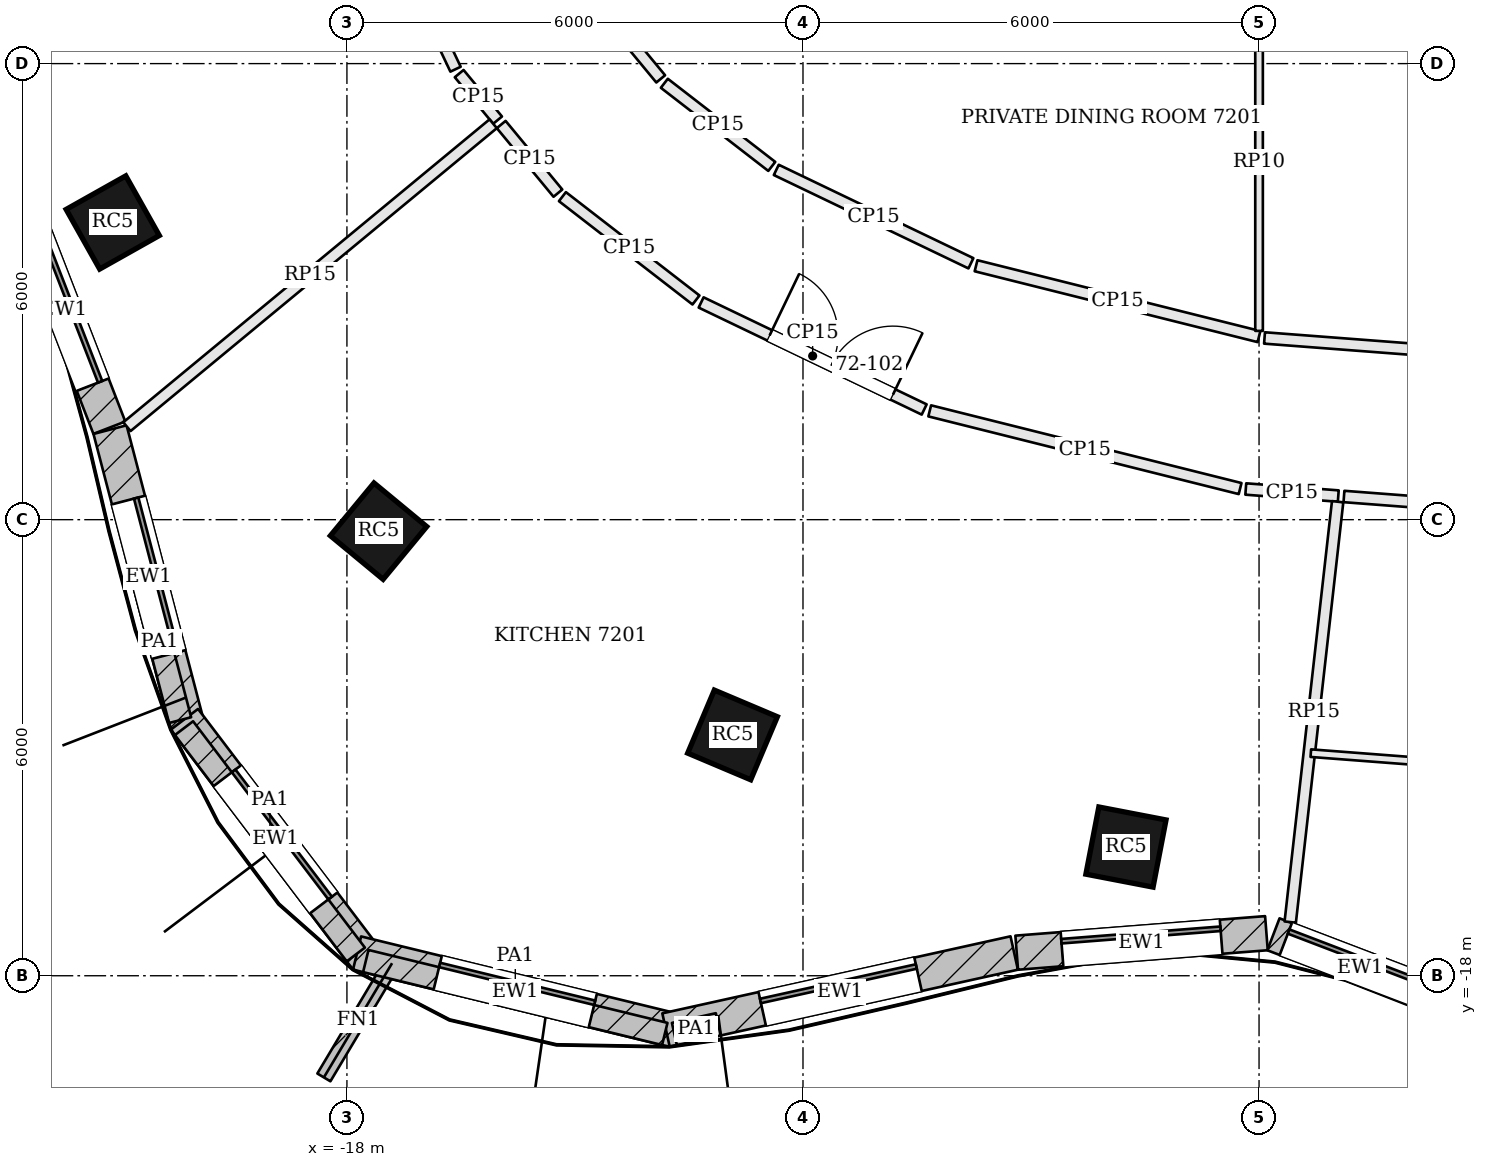
"""IFC4 building model, lengths in metres.
Left out: names, types, materials, properties, quantities, classifications, styles, units other than length and angle.
Written with IfcOpenShell. Run it as: python <this file> out.ifc"""

import sys

from ifc_helpers import new_model, si_unit, direction, frame, frame_2d, origin, origin_2d, place, context, subcontext, project, spatial, rectangle, extrude, element, fill, save


model = new_model("IFC4")
c1 = context("Model", 3, precision=1e-05, world=origin(), true_north=direction((0.0, 1.0)))
c2 = subcontext(c1, "Body", "Model", "MODEL_VIEW")
j1 = project(units=[si_unit("LENGTHUNIT", "METRE"), si_unit("PLANEANGLEUNIT", "RADIAN")], contexts=[c1])
p1 = place(None, origin())
s1 = spatial("IfcSite", under=j1, at=p1, CompositionType="ELEMENT")
p2 = place(p1, origin())
s2 = spatial("IfcBuilding", under=s1, at=p2, CompositionType="ELEMENT")
p3 = place(p2, frame((0.0, 0.0, 292.2)))
s3 = spatial("IfcBuildingStorey", under=s2, at=p3, CompositionType="ELEMENT", Elevation=292.2)
for number, where, z_axis, x_axis in (
    (1, (-21.081, -8.09, 0.0), (0.0, 0.0, 1.0), (0.49, -0.872, 0.0)),
    (2, (-17.584, -12.151, 0.0), (0.0, 0.0, 1.0), (0.771, -0.637, 0.0)),
    (3, (-12.927, -14.832, 0.0), (0.0, 0.0, 1.0), (0.921, -0.389, 0.0)),
    (4, (-7.751, -16.307, 0.0), (0.0, 0.0, 1.0), (0.982, -0.189, 0.0)),
):
    element("IfcColumn", number, at=place(p3, frame(where, z_axis=z_axis, x_axis=x_axis)), inside=s3, PredefinedType="COLUMN", context=c2, shape_type="SweptSolid", body=[
        extrude(rectangle(XDim=0.9, YDim=0.9, at=origin_2d()), origin(), (0.0, 0.0, 1.0), 3.9),
    ])
p4 = place(p3, frame((-22.323, -7.701, 0.0), z_axis=(0.0, 0.0, 1.0), x_axis=(0.361550075906, -0.932352692178, 0.0)))
e5 = element("IfcWall", 5, at=p4, inside=s3, PredefinedType="SOLIDWALL", context=c2, shape_type="SweptSolid", body=[
    extrude(rectangle(XDim=3.313, YDim=0.45, at=frame_2d((1.657, 0.0))), origin(), (0.0, 0.0, 1.0), 3.7),
])
p5 = place(p4, frame((0.607, 0.0, 0.9)))
e6 = element("IfcOpeningElement", 6, at=p5, cuts=e5, PredefinedType="OPENING", context=c2, shape_type="SweptSolid", body=[
    extrude(rectangle(XDim=2.1, YDim=2.3, at=frame_2d((1.05, 1.15))), frame((0.0, 0.235, 0.0), z_axis=(0.0, -1.0, 0.0), x_axis=(1.0, 0.0, 0.0)), (0.0, 0.0, 1.0), 0.47),
])
p6 = place(p3, frame((-21.117, -10.815, 0.0), z_axis=(0.0, 0.0, 1.0), x_axis=(0.253065392985, -0.967449175344, 0.0)))
e7 = element("IfcWall", 7, at=p6, inside=s3, PredefinedType="SOLIDWALL", context=c2, shape_type="SweptSolid", body=[
    extrude(rectangle(XDim=4.015, YDim=0.45, at=frame_2d((2.008, 0.0))), origin(), (0.0, 0.0, 1.0), 3.7),
])
p7 = place(p6, frame((0.958, 0.0, 0.9)))
e8 = element("IfcOpeningElement", 8, at=p7, cuts=e7, PredefinedType="OPENING", context=c2, shape_type="SweptSolid", body=[
    extrude(rectangle(XDim=2.1, YDim=2.3, at=frame_2d((1.05, 1.15))), frame((0.0, 0.235, 0.0), z_axis=(0.0, -1.0, 0.0), x_axis=(1.0, 0.0, 0.0)), (0.0, 0.0, 1.0), 0.47),
])
p8 = place(p3, frame((-20.138, -14.626, 0.0), z_axis=(0.0, 0.0, 1.0), x_axis=(0.604591324894, -0.796535830872, 0.0)))
e9 = element("IfcWall", 9, at=p8, inside=s3, PredefinedType="SOLIDWALL", context=c2, shape_type="SweptSolid", body=[
    extrude(rectangle(XDim=3.965, YDim=0.45, at=frame_2d((1.982, 0.0))), origin(), (0.0, 0.0, 1.0), 3.7),
])
p9 = place(p8, frame((0.932, 0.0, 0.9)))
e10 = element("IfcOpeningElement", 10, at=p9, cuts=e9, PredefinedType="OPENING", context=c2, shape_type="SweptSolid", body=[
    extrude(rectangle(XDim=2.1, YDim=2.3, at=frame_2d((1.05, 1.15))), frame((0.0, 0.235, 0.0), z_axis=(0.0, -1.0, 0.0), x_axis=(1.0, 0.0, 0.0)), (0.0, 0.0, 1.0), 0.47),
])
p10 = place(p3, frame((-17.867, -17.701, 0.0), z_axis=(0.0, 0.0, 1.0), x_axis=(0.971546885012, -0.236847314156, 0.0)))
e11 = element("IfcWall", 11, at=p10, inside=s3, PredefinedType="SOLIDWALL", context=c2, shape_type="SweptSolid", body=[
    extrude(rectangle(XDim=4.285, YDim=0.45, at=frame_2d((2.143, 0.0))), origin(), (0.0, 0.0, 1.0), 3.7),
])
p11 = place(p10, frame((1.093, 0.0, 0.9)))
e12 = element("IfcOpeningElement", 12, at=p11, cuts=e11, PredefinedType="OPENING", context=c2, shape_type="SweptSolid", body=[
    extrude(rectangle(XDim=2.1, YDim=2.3, at=frame_2d((1.05, 1.15))), frame((0.0, 0.235, 0.0), z_axis=(0.0, -1.0, 0.0), x_axis=(1.0, 0.0, 0.0)), (0.0, 0.0, 1.0), 0.47),
])
p12 = place(p3, frame((-13.802, -18.715, 0.0), z_axis=(0.0, 0.0, 1.0), x_axis=(0.976380129166, 0.216059814331, 0.0)))
e13 = element("IfcWall", 13, at=p12, inside=s3, PredefinedType="SOLIDWALL", context=c2, shape_type="SweptSolid", body=[
    extrude(rectangle(XDim=4.692, YDim=0.45, at=frame_2d((2.346, 0.0))), origin(), (0.0, 0.0, 1.0), 3.7),
])
p13 = place(p12, frame((1.296, 0.0, 0.9)))
e14 = element("IfcOpeningElement", 14, at=p13, cuts=e13, PredefinedType="OPENING", context=c2, shape_type="SweptSolid", body=[
    extrude(rectangle(XDim=2.1, YDim=2.3, at=frame_2d((1.05, 1.15))), frame((0.0, 0.235, 0.0), z_axis=(0.0, -1.0, 0.0), x_axis=(1.0, 0.0, 0.0)), (0.0, 0.0, 1.0), 0.47),
])
p14 = place(p3, frame((-9.188, -17.697, 0.0), z_axis=(0.0, 0.0, 1.0), x_axis=(0.996964028691, 0.077863505548, 0.0)))
e15 = element("IfcWall", 15, at=p14, inside=s3, PredefinedType="SOLIDWALL", context=c2, shape_type="SweptSolid", body=[
    extrude(rectangle(XDim=3.295, YDim=0.45, at=frame_2d((1.648, 0.0))), origin(), (0.0, 0.0, 1.0), 3.7),
])
p15 = place(p14, frame((0.598, 0.0, 0.9)))
e16 = element("IfcOpeningElement", 16, at=p15, cuts=e15, PredefinedType="OPENING", context=c2, shape_type="SweptSolid", body=[
    extrude(rectangle(XDim=2.1, YDim=2.3, at=frame_2d((1.05, 1.15))), frame((0.0, 0.235, 0.0), z_axis=(0.0, -1.0, 0.0), x_axis=(1.0, 0.0, 0.0)), (0.0, 0.0, 1.0), 0.47),
])
p16 = place(p3, frame((-5.811, -17.455, 0.0), z_axis=(0.0, 0.0, 1.0), x_axis=(0.934122271306, -0.35695319336, 0.0)))
e17 = element("IfcWall", 17, at=p16, inside=s3, PredefinedType="SOLIDWALL", context=c2, shape_type="SweptSolid", body=[
    extrude(rectangle(XDim=2.448, YDim=0.45, at=frame_2d((1.224, 0.0))), origin(), (0.0, 0.0, 1.0), 3.7),
])
p17 = place(p16, frame((0.174, 0.0, 0.9)))
e18 = element("IfcOpeningElement", 18, at=p17, cuts=e17, PredefinedType="OPENING", context=c2, shape_type="SweptSolid", body=[
    extrude(rectangle(XDim=2.1, YDim=2.3, at=frame_2d((1.05, 1.15))), frame((0.0, 0.235, 0.0), z_axis=(0.0, -1.0, 0.0), x_axis=(1.0, 0.0, 0.0)), (0.0, 0.0, 1.0), 0.47),
])
p18 = place(p3, frame((-17.406, -17.835, 0.0), z_axis=(0.0, 0.0, 1.0), x_axis=(-0.512648290506, -0.858598701514, 0.0)))
e19 = element("IfcWall", 19, at=p18, inside=s3, PredefinedType="SOLIDWALL", context=c2, shape_type="SweptSolid", body=[
    extrude(rectangle(XDim=1.75, YDim=0.2, at=frame_2d((0.875, 0.0))), origin(), (0.0, 0.0, 1.0), 3.7),
])
p19 = place(p3, frame((-20.733, -12.579, 3.9), z_axis=(0.0, 0.0, 1.0), x_axis=(0.253024439664, -0.967459886989, 0.0)))
e20 = element("IfcWall", 20, at=p19, inside=s3, PredefinedType="PARAPET", context=c2, shape_type="SweptSolid", body=[
    extrude(rectangle(XDim=2.128, YDim=0.3, at=frame_2d((1.064, 0.0))), origin(), (0.0, 0.0, 1.0), 1.1),
])
p20 = place(p3, frame((-20.143, -14.743, 3.9), z_axis=(0.0, 0.0, 1.0), x_axis=(0.60459800049, -0.796530763878, 0.0)))
e21 = element("IfcWall", 21, at=p20, inside=s3, PredefinedType="PARAPET", context=c2, shape_type="SweptSolid", body=[
    extrude(rectangle(XDim=3.739, YDim=0.3, at=frame_2d((1.869, 0.0))), origin(), (0.0, 0.0, 1.0), 1.1),
])
p21 = place(p3, frame((-17.752, -17.807, 3.9), z_axis=(0.0, 0.0, 1.0), x_axis=(0.971541327586, -0.236870109537, 0.0)))
e22 = element("IfcWall", 22, at=p21, inside=s3, PredefinedType="PARAPET", context=c2, shape_type="SweptSolid", body=[
    extrude(rectangle(XDim=4.049, YDim=0.3, at=frame_2d((2.024, 0.0))), origin(), (0.0, 0.0, 1.0), 1.1),
])
p22 = place(p3, frame((-13.692, -18.767, 3.9), z_axis=(0.0, 0.0, 1.0), x_axis=(0.976322856637, 0.216318468024, 0.0)))
e23 = element("IfcWall", 23, at=p22, inside=s3, PredefinedType="PARAPET", context=c2, shape_type="SweptSolid", body=[
    extrude(rectangle(XDim=0.591, YDim=0.3, at=frame_2d((0.296, 0.0))), origin(), (0.0, 0.0, 1.0), 1.1),
])
p23 = place(p3, frame((-17.425, -4.269, 0.0), z_axis=(0.0, 0.0, 1.0), x_axis=(0.427886578366, -0.90383243804, 0.0)))
e24 = element("IfcWall", 24, at=p23, inside=s3, PredefinedType="PARTITIONING", context=c2, shape_type="SweptSolid", body=[
    extrude(rectangle(XDim=1.996, YDim=0.15, at=frame_2d((0.998, 0.0))), origin(), (0.0, 0.0, 1.0), 3.198),
])
p24 = place(p3, frame((-16.523, -6.132, 0.0), z_axis=(0.0, 0.0, 1.0), x_axis=(0.636698606768, -0.771112757085, 0.0)))
e25 = element("IfcWall", 25, at=p24, inside=s3, PredefinedType="PARTITIONING", context=c2, shape_type="SweptSolid", body=[
    extrude(rectangle(XDim=0.794, YDim=0.15, at=frame_2d((0.397, 0.0))), origin(), (0.0, 0.0, 1.0), 3.198),
])
p25 = place(p3, frame((-20.894, -10.777, 0.0), z_axis=(0.0, 0.0, 1.0), x_axis=(0.770606553, 0.637311180251, 0.0)))
e26 = element("IfcWall", 26, at=p25, inside=s3, PredefinedType="PARTITIONING", context=c2, shape_type="SweptSolid", body=[
    extrude(rectangle(XDim=6.253, YDim=0.15, at=frame_2d((3.126, 0.0))), origin(), (0.0, 0.0, 1.0), 3.234),
])
p26 = place(p3, frame((-15.97, -6.802, 0.0), z_axis=(0.0, 0.0, 1.0), x_axis=(0.636897609689, -0.770948399552, 0.0)))
e27 = element("IfcWall", 27, at=p26, inside=s3, PredefinedType="PARTITIONING", context=c2, shape_type="SweptSolid", body=[
    extrude(rectangle(XDim=1.171, YDim=0.15, at=frame_2d((0.585, 0.0))), origin(), (0.0, 0.0, 1.0), 3.198),
])
p27 = place(p3, frame((-15.165, -7.75, 0.0), z_axis=(0.0, 0.0, 1.0), x_axis=(0.790917548929, -0.611922732701, 0.0)))
e28 = element("IfcWall", 28, at=p27, inside=s3, PredefinedType="PARTITIONING", context=c2, shape_type="SweptSolid", body=[
    extrude(rectangle(XDim=2.222, YDim=0.15, at=frame_2d((1.111, 0.0))), origin(), (0.0, 0.0, 1.0), 3.198),
])
p28 = place(p3, frame((-13.34, -9.142, 0.0), z_axis=(0.0, 0.0, 1.0), x_axis=(0.901599124721, -0.432572558425, 0.0)))
e29 = element("IfcWall", 29, at=p28, inside=s3, PredefinedType="PARTITIONING", context=c2, shape_type="SweptSolid", body=[
    extrude(rectangle(XDim=3.255, YDim=0.15, at=frame_2d((1.627, 0.0))), origin(), (0.0, 0.0, 1.0), 3.198),
])
p29 = place(p28, frame((1.0, 0.0, 0.0)))
e30 = element("IfcOpeningElement", 30, at=p29, cuts=e29, PredefinedType="OPENING", context=c2, shape_type="SweptSolid", body=[
    extrude(rectangle(XDim=1.8, YDim=2.1, at=frame_2d((0.9, 1.05))), frame((0.0, 0.085, 0.0), z_axis=(0.0, -1.0, 0.0), x_axis=(1.0, 0.0, 0.0)), (0.0, 0.0, 1.0), 0.17),
])
p30 = place(p3, frame((-10.333, -10.569, 0.0), z_axis=(0.0, 0.0, 1.0), x_axis=(0.970067398009, -0.242835836151, 0.0)))
e31 = element("IfcWall", 31, at=p30, inside=s3, PredefinedType="PARTITIONING", context=c2, shape_type="SweptSolid", body=[
    extrude(rectangle(XDim=4.209, YDim=0.15, at=frame_2d((2.105, 0.0))), origin(), (0.0, 0.0, 1.0), 3.198),
])
p31 = place(p3, frame((-6.175, -11.596, 0.0), z_axis=(0.0, 0.0, 1.0), x_axis=(0.997106038867, -0.076023333621, 0.0)))
e32 = element("IfcWall", 32, at=p31, inside=s3, PredefinedType="PARTITIONING", context=c2, shape_type="SweptSolid", body=[
    extrude(rectangle(XDim=1.22, YDim=0.15, at=frame_2d((0.61, 0.0))), origin(), (0.0, 0.0, 1.0), 3.198),
])
p32 = place(p3, frame((-5.59, -17.294, 0.0), z_axis=(0.0, 0.0, 1.0), x_axis=(0.112044411854, 0.993703200041, 0.0)))
e33 = element("IfcWall", 33, at=p32, inside=s3, PredefinedType="PARTITIONING", context=c2, shape_type="SweptSolid", body=[
    extrude(rectangle(XDim=5.565, YDim=0.15, at=frame_2d((2.783, 0.0))), origin(), (0.0, 0.0, 1.0), 3.234),
])
p33 = place(p3, frame((-4.883, -11.695, 0.0), z_axis=(0.0, 0.0, 1.0), x_axis=(0.997096936577, -0.076142623207, 0.0)))
e34 = element("IfcWall", 34, at=p33, inside=s3, PredefinedType="PARTITIONING", context=c2, shape_type="SweptSolid", body=[
    extrude(rectangle(XDim=3.944, YDim=0.15, at=frame_2d((1.972, 0.0))), origin(), (0.0, 0.0, 1.0), 3.198),
])
p34 = place(p33, frame((1.604, 0.0, 0.0)))
e35 = element("IfcOpeningElement", 35, at=p34, cuts=e34, PredefinedType="OPENING", context=c2, shape_type="SweptSolid", body=[
    extrude(rectangle(XDim=1.8, YDim=2.1, at=frame_2d((0.9, 1.05))), frame((0.0, 0.085, 0.0), z_axis=(0.0, -1.0, 0.0), x_axis=(1.0, 0.0, 0.0)), (0.0, 0.0, 1.0), 0.17),
])
p35 = place(p3, frame((-0.982, -9.987, 0.0), z_axis=(0.0, 0.0, 1.0), x_axis=(-0.997096607341, 0.07614693447, 0.0)))
e36 = element("IfcWall", 36, at=p35, inside=s3, PredefinedType="PARTITIONING", context=c2, shape_type="SweptSolid", body=[
    extrude(rectangle(XDim=4.96, YDim=0.15, at=frame_2d((2.48, 0.0))), origin(), (0.0, 0.0, 1.0), 3.198),
])
p36 = place(p3, frame((-6.001, -9.591, 0.0), z_axis=(0.0, 0.0, 1.0), x_axis=(-0.970063855769, 0.242849986061, 0.0)))
e37 = element("IfcWall", 37, at=p36, inside=s3, PredefinedType="PARTITIONING", context=c2, shape_type="SweptSolid", body=[
    extrude(rectangle(XDim=3.837, YDim=0.15, at=frame_2d((1.919, 0.0))), origin(), (0.0, 0.0, 1.0), 3.198),
])
p37 = place(p3, frame((-9.791, -8.627, 0.0), z_axis=(0.0, 0.0, 1.0), x_axis=(-0.901598165215, 0.432574558292, 0.0)))
e38 = element("IfcWall", 38, at=p37, inside=s3, PredefinedType="PARTITIONING", context=c2, shape_type="SweptSolid", body=[
    extrude(rectangle(XDim=2.84, YDim=0.15, at=frame_2d((1.42, 0.0))), origin(), (0.0, 0.0, 1.0), 3.198),
])
p38 = place(p3, frame((-12.411, -7.353, 0.0), z_axis=(0.0, 0.0, 1.0), x_axis=(-0.790894311556, 0.611952766109, 0.0)))
e39 = element("IfcWall", 39, at=p38, inside=s3, PredefinedType="PARTITIONING", context=c2, shape_type="SweptSolid", body=[
    extrude(rectangle(XDim=1.787, YDim=0.15, at=frame_2d((0.894, 0.0))), origin(), (0.0, 0.0, 1.0), 3.198),
])
p39 = place(p3, frame((-13.872, -6.201, 0.0), z_axis=(0.0, 0.0, 1.0), x_axis=(-0.636832838855, 0.771001903601, 0.0)))
e40 = element("IfcWall", 40, at=p39, inside=s3, PredefinedType="PARTITIONING", context=c2, shape_type="SweptSolid", body=[
    extrude(rectangle(XDim=1.558, YDim=0.15, at=frame_2d((0.779, 0.0))), origin(), (0.0, 0.0, 1.0), 3.198),
])
p40 = place(p3, frame((-1.073, -15.396, 0.0), z_axis=(0.0, 0.0, 1.0), x_axis=(-0.997093140471, 0.076192317369, 0.0)))
e41 = element("IfcWall", 41, at=p40, inside=s3, PredefinedType="PARTITIONING", context=c2, shape_type="SweptSolid", body=[
    extrude(rectangle(XDim=4.259, YDim=0.1, at=frame_2d((2.129, 0.0))), origin(), (0.0, 0.0, 1.0), 3.198),
])
p41 = place(p3, frame((-6.0, -9.516, 0.0), z_axis=(0.0, 0.0, 1.0), x_axis=(0.0, 1.0, 0.0)))
e42 = element("IfcWall", 42, at=p41, inside=s3, PredefinedType="PARTITIONING", context=c2, shape_type="SweptSolid", body=[
    extrude(rectangle(XDim=4.441, YDim=0.1, at=frame_2d((2.221, 0.0))), origin(), (0.0, 0.0, 1.0), 3.198),
])
p42 = place(p5, origin())
e43 = element("IfcWindow", 43, at=p42, inside=s3, PartitioningType="SINGLE_PANEL", PredefinedType="WINDOW", context=c2, shape_type="SweptSolid", body=[
    extrude(rectangle(XDim=2.1, YDim=2.3, at=frame_2d((1.05, 1.15))), frame((0.0, 0.135, 0.0), z_axis=(0.0, -1.0, 0.0), x_axis=(1.0, 0.0, 0.0)), (0.0, 0.0, 1.0), 0.06),
])
fill(e6, e43)
p43 = place(p7, origin())
e44 = element("IfcWindow", 44, at=p43, inside=s3, PartitioningType="SINGLE_PANEL", PredefinedType="WINDOW", context=c2, shape_type="SweptSolid", body=[
    extrude(rectangle(XDim=2.1, YDim=2.3, at=frame_2d((1.05, 1.15))), frame((0.0, 0.135, 0.0), z_axis=(0.0, -1.0, 0.0), x_axis=(1.0, 0.0, 0.0)), (0.0, 0.0, 1.0), 0.06),
])
fill(e8, e44)
p44 = place(p9, origin())
e45 = element("IfcWindow", 45, at=p44, inside=s3, PartitioningType="SINGLE_PANEL", PredefinedType="WINDOW", context=c2, shape_type="SweptSolid", body=[
    extrude(rectangle(XDim=2.1, YDim=2.3, at=frame_2d((1.05, 1.15))), frame((0.0, 0.135, 0.0), z_axis=(0.0, -1.0, 0.0), x_axis=(1.0, 0.0, 0.0)), (0.0, 0.0, 1.0), 0.06),
])
fill(e10, e45)
p45 = place(p11, origin())
e46 = element("IfcWindow", 46, at=p45, inside=s3, PartitioningType="SINGLE_PANEL", PredefinedType="WINDOW", context=c2, shape_type="SweptSolid", body=[
    extrude(rectangle(XDim=2.1, YDim=2.3, at=frame_2d((1.05, 1.15))), frame((0.0, 0.135, 0.0), z_axis=(0.0, -1.0, 0.0), x_axis=(1.0, 0.0, 0.0)), (0.0, 0.0, 1.0), 0.06),
])
fill(e12, e46)
p46 = place(p13, origin())
e47 = element("IfcWindow", 47, at=p46, inside=s3, PartitioningType="SINGLE_PANEL", PredefinedType="WINDOW", context=c2, shape_type="SweptSolid", body=[
    extrude(rectangle(XDim=2.1, YDim=2.3, at=frame_2d((1.05, 1.15))), frame((0.0, 0.135, 0.0), z_axis=(0.0, -1.0, 0.0), x_axis=(1.0, 0.0, 0.0)), (0.0, 0.0, 1.0), 0.06),
])
fill(e14, e47)
p47 = place(p15, origin())
e48 = element("IfcWindow", 48, at=p47, inside=s3, PartitioningType="SINGLE_PANEL", PredefinedType="WINDOW", context=c2, shape_type="SweptSolid", body=[
    extrude(rectangle(XDim=2.1, YDim=2.3, at=frame_2d((1.05, 1.15))), frame((0.0, 0.135, 0.0), z_axis=(0.0, -1.0, 0.0), x_axis=(1.0, 0.0, 0.0)), (0.0, 0.0, 1.0), 0.06),
])
fill(e16, e48)
p48 = place(p17, origin())
e49 = element("IfcWindow", 49, at=p48, inside=s3, PartitioningType="SINGLE_PANEL", PredefinedType="WINDOW", context=c2, shape_type="SweptSolid", body=[
    extrude(rectangle(XDim=2.1, YDim=2.3, at=frame_2d((1.05, 1.15))), frame((0.0, 0.135, 0.0), z_axis=(0.0, -1.0, 0.0), x_axis=(1.0, 0.0, 0.0)), (0.0, 0.0, 1.0), 0.06),
])
fill(e18, e49)
p49 = place(p29, origin())
e50 = element("IfcDoor", 50, at=p49, inside=s3, OperationType="DOUBLE_DOOR_SINGLE_SWING", PredefinedType="DOOR", context=c2, shape_type="SweptSolid", body=[
    extrude(rectangle(XDim=1.8, YDim=2.1, at=frame_2d((0.9, 1.05))), frame((0.0, 0.025, 0.0), z_axis=(0.0, -1.0, 0.0), x_axis=(1.0, 0.0, 0.0)), (0.0, 0.0, 1.0), 0.05),
])
fill(e30, e50)
save(model, sys.argv[1])
